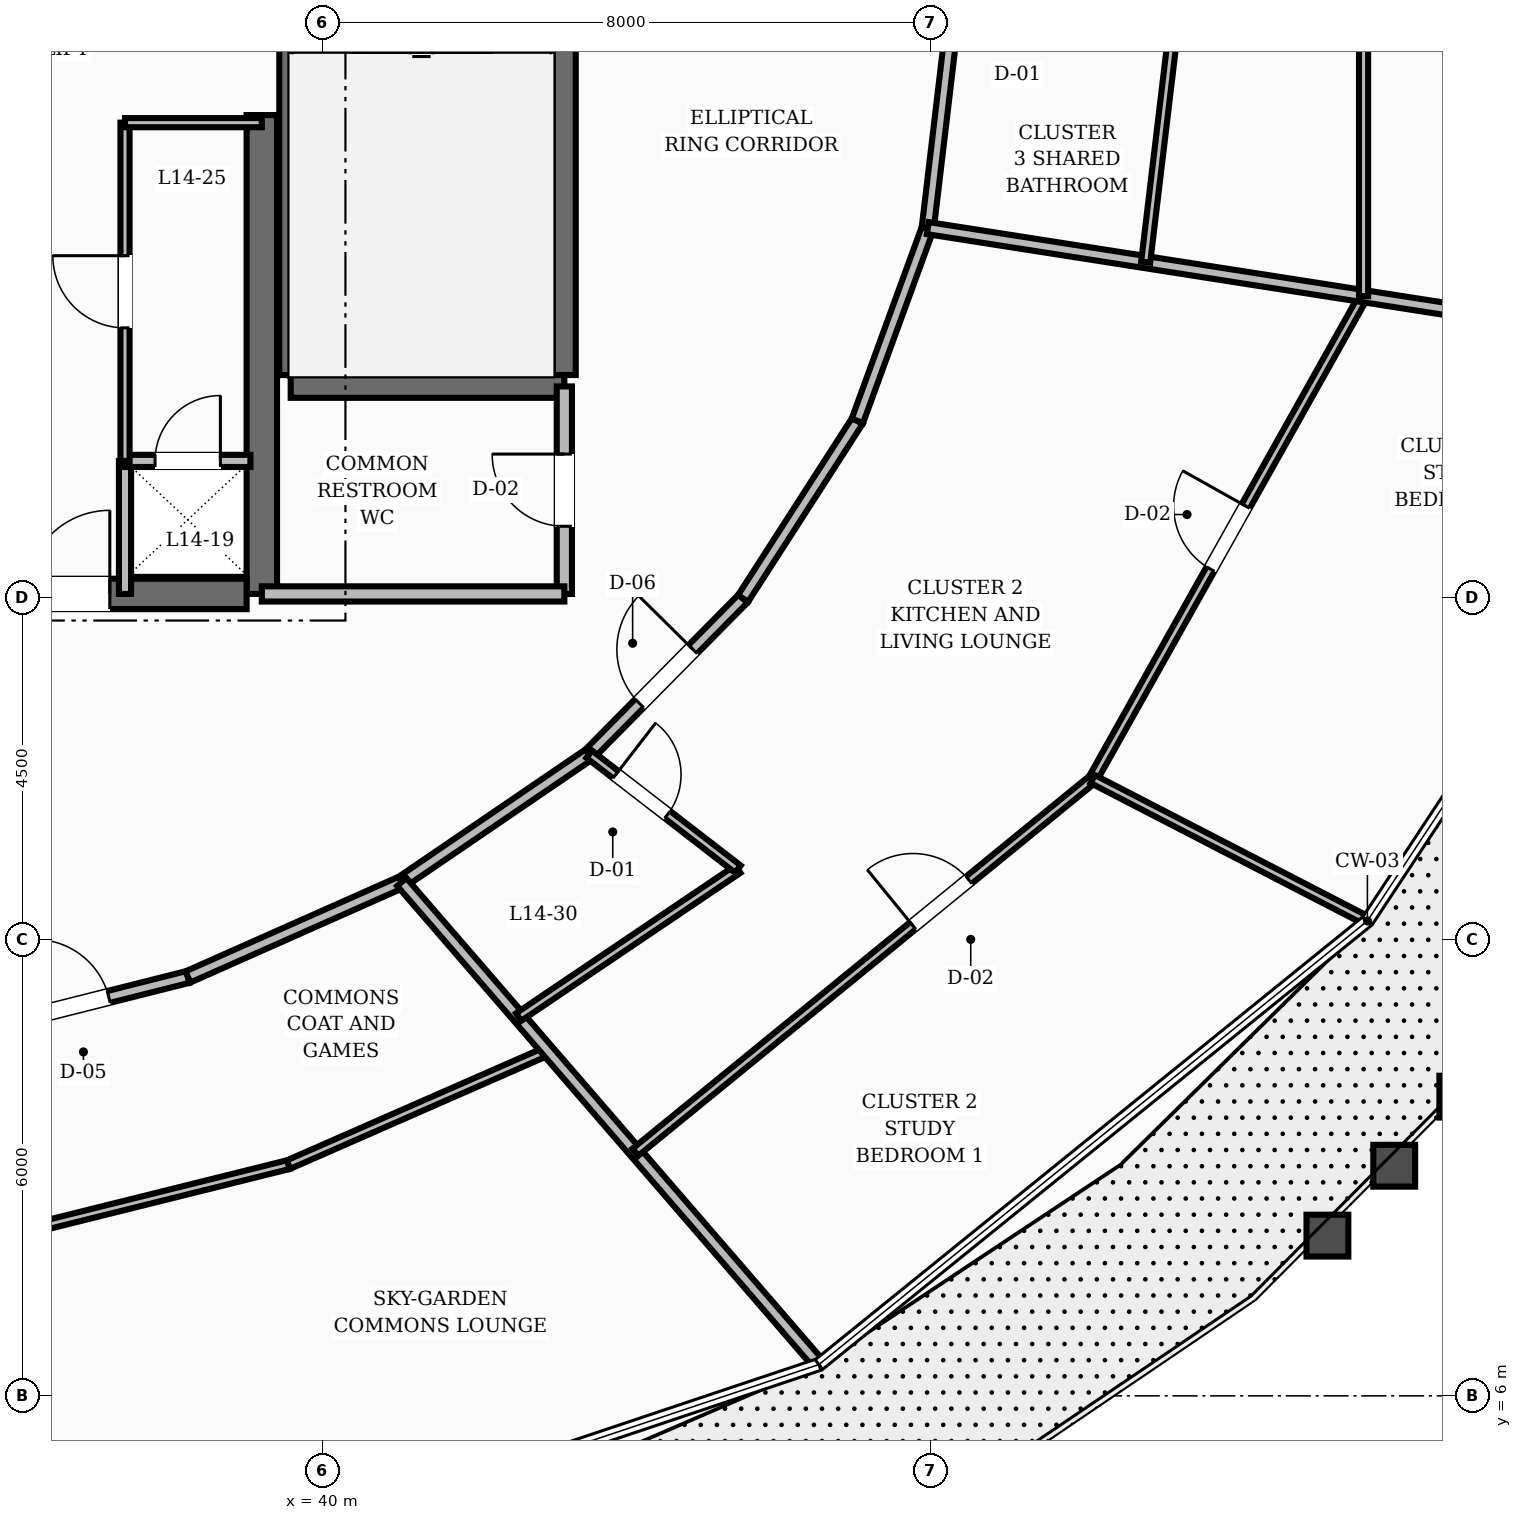
"""IFC4 building model, lengths in metres.
Left out: names, types, materials, properties, quantities, classifications, styles, units other than length and angle.
Written with IfcOpenShell. Run it as: python <this file> out.ifc"""

import sys

from ifc_helpers import new_model, si_unit, direction, frame, frame_2d, origin, place, context, subcontext, project, spatial, rectangle, extrude, element, fill, save


model = new_model("IFC4")
c1 = context("Model", 3, precision=1e-05, world=origin(), true_north=direction((0.0, 1.0)))
c2 = subcontext(c1, "Body", "Model", "MODEL_VIEW")
j1 = project(units=[si_unit("LENGTHUNIT", "METRE"), si_unit("PLANEANGLEUNIT", "RADIAN")], contexts=[c1])
p1 = place(None, origin())
s1 = spatial("IfcSite", under=j1, at=p1, CompositionType="ELEMENT")
p2 = place(p1, origin())
s2 = spatial("IfcBuilding", under=s1, at=p2, CompositionType="ELEMENT")
p3 = place(p2, frame((0.0, 0.0, 59.2)))
s3 = spatial("IfcBuildingStorey", under=s2, at=p3, CompositionType="ELEMENT", Elevation=59.2)
p4 = place(p3, frame((39.2, 16.55, 0.0), z_axis=(0.0, 0.0, 1.0), x_axis=(0.0, 1.0, 0.0)))
e1 = element("IfcWall", 1, at=p4, inside=s3, PredefinedType="SHEAR", context=c2, shape_type="SweptSolid", body=[
    extrude(rectangle(XDim=6.3, YDim=0.4, at=frame_2d((3.15, 0.0))), origin(), (0.0, 0.0, 1.0), 3.6),
])
p5 = place(p3, frame((35.8, 16.55, 0.0), z_axis=(0.0, 0.0, 1.0), x_axis=(1.0, 0.0, 0.0)))
e2 = element("IfcWall", 2, at=p5, inside=s3, PredefinedType="SHEAR", context=c2, shape_type="SweptSolid", body=[
    extrude(rectangle(XDim=3.2, YDim=0.4, at=frame_2d((1.6, 0.0))), origin(), (0.0, 0.0, 1.0), 3.6),
])
p6 = place(p5, frame((0.3, 0.0, 0.0)))
e3 = element("IfcOpeningElement", 3, at=p6, cuts=e2, PredefinedType="OPENING", context=c2, shape_type="SweptSolid", body=[
    extrude(rectangle(XDim=1.1, YDim=2.1, at=frame_2d((0.55, 1.05))), frame((0.0, 0.21, 0.0), z_axis=(0.0, -1.0, 0.0), x_axis=(1.0, 0.0, 0.0)), (0.0, 0.0, 1.0), 0.42),
])
for number, where, z_axis, x_axis in (
    (4, (43.18, 19.43, 0.0), (0.0, 0.0, 1.0), (0.0, 1.0, 0.0)),
    (5, (39.58, 19.43, 0.0), (0.0, 0.0, 1.0), (0.0, 1.0, 0.0)),
):
    element("IfcWall", number, at=place(p3, frame(where, z_axis=z_axis, x_axis=x_axis)), inside=s3, PredefinedType="SHEAR", context=c2, shape_type="SweptSolid", body=[
        extrude(rectangle(XDim=8.74, YDim=0.3, at=frame_2d((4.37, 0.0))), origin(), (0.0, 0.0, 1.0), 3.6),
    ])
p7 = place(p3, frame((39.58, 19.28, 0.0), z_axis=(0.0, 0.0, 1.0), x_axis=(1.0, 0.0, 0.0)))
e6 = element("IfcWall", 6, at=p7, inside=s3, PredefinedType="SHEAR", context=c2, shape_type="SweptSolid", body=[
    extrude(rectangle(XDim=3.6, YDim=0.3, at=frame_2d((1.8, 0.0))), origin(), (0.0, 0.0, 1.0), 3.6),
])
p8 = place(p3, frame((43.18, 16.55, 0.0), z_axis=(0.0, 0.0, 1.0), x_axis=(0.0, 1.0, 0.0)))
e7 = element("IfcWall", 7, at=p8, inside=s3, PredefinedType="SOLIDWALL", context=c2, shape_type="SweptSolid", body=[
    extrude(rectangle(XDim=2.73, YDim=0.2, at=frame_2d((1.365, 0.0))), origin(), (0.0, 0.0, 1.0), 2.61),
])
p9 = place(p8, frame((0.89, 0.0, 0.0)))
e8 = element("IfcOpeningElement", 8, at=p9, cuts=e7, PredefinedType="OPENING", context=c2, shape_type="SweptSolid", body=[
    extrude(rectangle(XDim=0.95, YDim=2.1, at=frame_2d((0.475, 1.05))), frame((0.0, 0.11, 0.0), z_axis=(0.0, -1.0, 0.0), x_axis=(1.0, 0.0, 0.0)), (0.0, 0.0, 1.0), 0.22),
])
p10 = place(p3, frame((39.2, 16.55, 0.0), z_axis=(0.0, 0.0, 1.0), x_axis=(1.0, 0.0, 0.0)))
e9 = element("IfcWall", 9, at=p10, inside=s3, PredefinedType="SOLIDWALL", context=c2, shape_type="SweptSolid", body=[
    extrude(rectangle(XDim=3.98, YDim=0.2, at=frame_2d((1.99, 0.0))), origin(), (0.0, 0.0, 1.0), 2.61),
])
p11 = place(p3, frame((37.4, 16.55, 0.0), z_axis=(0.0, 0.0, 1.0), x_axis=(0.0, 1.0, 0.0)))
e10 = element("IfcWall", 10, at=p11, inside=s3, PredefinedType="SOLIDWALL", context=c2, shape_type="SweptSolid", body=[
    extrude(rectangle(XDim=1.75, YDim=0.16, at=frame_2d((0.875, 0.0))), origin(), (0.0, 0.0, 1.0), 2.61),
])
p12 = place(p3, frame((37.4, 18.3, 0.0), z_axis=(0.0, 0.0, 1.0), x_axis=(1.0, 0.0, 0.0)))
e11 = element("IfcWall", 11, at=p12, inside=s3, PredefinedType="SOLIDWALL", context=c2, shape_type="SweptSolid", body=[
    extrude(rectangle(XDim=1.65, YDim=0.16, at=frame_2d((0.825, 0.0))), origin(), (0.0, 0.0, 1.0), 2.61),
])
p13 = place(p12, frame((0.395, 0.0, 0.0)))
e12 = element("IfcOpeningElement", 12, at=p13, cuts=e11, PredefinedType="OPENING", context=c2, shape_type="SweptSolid", body=[
    extrude(rectangle(XDim=0.86, YDim=2.1, at=frame_2d((0.43, 1.05))), frame((0.0, 0.09, 0.0), z_axis=(0.0, -1.0, 0.0), x_axis=(1.0, 0.0, 0.0)), (0.0, 0.0, 1.0), 0.18),
])
p14 = place(p3, frame((37.4, 18.3, 0.0), z_axis=(0.0, 0.0, 1.0), x_axis=(0.0, 1.0, 0.0)))
e13 = element("IfcWall", 13, at=p14, inside=s3, PredefinedType="PARTITIONING", context=c2, shape_type="SweptSolid", body=[
    extrude(rectangle(XDim=4.45, YDim=0.12, at=frame_2d((2.225, 0.0))), origin(), (0.0, 0.0, 1.0), 2.61),
])
p15 = place(p14, frame((1.75, 0.0, 0.0)))
e14 = element("IfcOpeningElement", 14, at=p15, cuts=e13, PredefinedType="OPENING", context=c2, shape_type="SweptSolid", body=[
    extrude(rectangle(XDim=0.95, YDim=2.1, at=frame_2d((0.475, 1.05))), frame((0.0, 0.07, 0.0), z_axis=(0.0, -1.0, 0.0), x_axis=(1.0, 0.0, 0.0)), (0.0, 0.0, 1.0), 0.14),
])
p16 = place(p3, frame((37.4, 22.75, 0.0), z_axis=(0.0, 0.0, 1.0), x_axis=(1.0, 0.0, 0.0)))
e15 = element("IfcWall", 15, at=p16, inside=s3, PredefinedType="PARTITIONING", context=c2, shape_type="SweptSolid", body=[
    extrude(rectangle(XDim=1.8, YDim=0.12, at=frame_2d((0.9, 0.0))), origin(), (0.0, 0.0, 1.0), 2.61),
])
p17 = place(p3, frame((35.175, 10.742, 0.0), z_axis=(0.0, 0.0, 1.0), x_axis=(0.969689238064, 0.244341526521, 0.0)))
e16 = element("IfcWall", 16, at=p17, inside=s3, PredefinedType="SOLIDWALL", context=c2, shape_type="SweptSolid", body=[
    extrude(rectangle(XDim=3.148, YDim=0.16, at=frame_2d((1.574, 0.0))), origin(), (0.0, 0.0, 1.0), 2.61),
])
p18 = place(p17, frame((1.074, 0.0, 0.0)))
e17 = element("IfcOpeningElement", 17, at=p18, cuts=e16, PredefinedType="OPENING", context=c2, shape_type="SweptSolid", body=[
    extrude(rectangle(XDim=1.0, YDim=2.1, at=frame_2d((0.5, 1.05))), frame((0.0, 0.09, 0.0), z_axis=(0.0, -1.0, 0.0), x_axis=(1.0, 0.0, 0.0)), (0.0, 0.0, 1.0), 0.18),
])
p19 = place(p3, frame((38.228, 11.511, 0.0), z_axis=(0.0, 0.0, 1.0), x_axis=(0.913952123493, 0.405822024984, 0.0)))
e18 = element("IfcWall", 18, at=p19, inside=s3, PredefinedType="SOLIDWALL", context=c2, shape_type="SweptSolid", body=[
    extrude(rectangle(XDim=3.078, YDim=0.16, at=frame_2d((1.539, 0.0))), origin(), (0.0, 0.0, 1.0), 2.61),
])
p20 = place(p3, frame((41.041, 12.76, 0.0), z_axis=(0.0, 0.0, 1.0), x_axis=(0.826293096206, 0.56324037423, 0.0)))
e19 = element("IfcWall", 19, at=p20, inside=s3, PredefinedType="SOLIDWALL", context=c2, shape_type="SweptSolid", body=[
    extrude(rectangle(XDim=2.985, YDim=0.16, at=frame_2d((1.492, 0.0))), origin(), (0.0, 0.0, 1.0), 2.61),
])
p21 = place(p3, frame((43.508, 14.441, 0.0), z_axis=(0.0, 0.0, 1.0), x_axis=(0.702811997, 0.711375636969, 0.0)))
e20 = element("IfcWall", 20, at=p21, inside=s3, PredefinedType="SOLIDWALL", context=c2, shape_type="SweptSolid", body=[
    extrude(rectangle(XDim=2.879, YDim=0.16, at=frame_2d((1.44, 0.0))), origin(), (0.0, 0.0, 1.0), 2.61),
])
p22 = place(p21, frame((0.94, 0.0, 0.0)))
e21 = element("IfcOpeningElement", 21, at=p22, cuts=e20, PredefinedType="OPENING", context=c2, shape_type="SweptSolid", body=[
    extrude(rectangle(XDim=1.0, YDim=2.1, at=frame_2d((0.5, 1.05))), frame((0.0, 0.09, 0.0), z_axis=(0.0, -1.0, 0.0), x_axis=(1.0, 0.0, 0.0)), (0.0, 0.0, 1.0), 0.18),
])
p23 = place(p3, frame((45.531, 16.49, 0.0), z_axis=(0.0, 0.0, 1.0), x_axis=(0.541126045017, 0.840941498206, 0.0)))
e22 = element("IfcWall", 22, at=p23, inside=s3, PredefinedType="SOLIDWALL", context=c2, shape_type="SweptSolid", body=[
    extrude(rectangle(XDim=2.779, YDim=0.16, at=frame_2d((1.39, 0.0))), origin(), (0.0, 0.0, 1.0), 2.61),
])
p24 = place(p3, frame((47.035, 18.827, 0.0), z_axis=(0.0, 0.0, 1.0), x_axis=(0.343013437329, 0.939330496583, 0.0)))
e23 = element("IfcWall", 23, at=p24, inside=s3, PredefinedType="SOLIDWALL", context=c2, shape_type="SweptSolid", body=[
    extrude(rectangle(XDim=2.7, YDim=0.16, at=frame_2d((1.35, 0.0))), origin(), (0.0, 0.0, 1.0), 2.61),
])
p25 = place(p3, frame((47.961, 21.363, 0.0), z_axis=(0.0, 0.0, 1.0), x_axis=(0.117763961213, 0.99304161516, 0.0)))
e24 = element("IfcWall", 24, at=p25, inside=s3, PredefinedType="SOLIDWALL", context=c2, shape_type="SweptSolid", body=[
    extrude(rectangle(XDim=2.656, YDim=0.16, at=frame_2d((1.328, 0.0))), origin(), (0.0, 0.0, 1.0), 2.61),
])
p26 = place(p3, frame((35.849, 8.121, 0.0), z_axis=(0.0, 0.0, 1.0), x_axis=(0.970386733017, 0.241556594579, 0.0)))
e25 = element("IfcWall", 25, at=p26, inside=s3, PredefinedType="PARTITIONING", context=c2, shape_type="SweptSolid", body=[
    extrude(rectangle(XDim=3.814, YDim=0.12, at=frame_2d((1.907, 0.0))), origin(), (0.0, 0.0, 1.0), 2.61),
])
p27 = place(p3, frame((39.551, 9.042, 0.0), z_axis=(0.0, 0.0, 1.0), x_axis=(0.915800473989, 0.401633529278, 0.0)))
e26 = element("IfcWall", 26, at=p27, inside=s3, PredefinedType="PARTITIONING", context=c2, shape_type="SweptSolid", body=[
    extrude(rectangle(XDim=3.725, YDim=0.12, at=frame_2d((1.863, 0.0))), origin(), (0.0, 0.0, 1.0), 2.61),
])
p28 = place(p3, frame((41.041, 12.76, 0.0), z_axis=(0.0, 0.0, 1.0), x_axis=(0.654032006628, -0.756466875881, 0.0)))
e27 = element("IfcWall", 27, at=p28, inside=s3, PredefinedType="SOLIDWALL", context=c2, shape_type="SweptSolid", body=[
    extrude(rectangle(XDim=8.342, YDim=0.16, at=frame_2d((4.171, 0.0))), origin(), (0.0, 0.0, 1.0), 2.61),
])
p29 = place(p3, frame((42.578, 10.983, 0.0), z_axis=(0.0, 0.0, 1.0), x_axis=(0.828951119093, 0.559321054632, 0.0)))
e28 = element("IfcWall", 28, at=p29, inside=s3, PredefinedType="PARTITIONING", context=c2, shape_type="SweptSolid", body=[
    extrude(rectangle(XDim=3.481, YDim=0.12, at=frame_2d((1.74, 0.0))), origin(), (0.0, 0.0, 1.0), 2.61),
])
p30 = place(p3, frame((43.508, 14.441, 0.0), z_axis=(0.0, 0.0, 1.0), x_axis=(0.791204628393, -0.611551499065, 0.0)))
e29 = element("IfcWall", 29, at=p30, inside=s3, PredefinedType="PARTITIONING", context=c2, shape_type="SweptSolid", body=[
    extrude(rectangle(XDim=2.472, YDim=0.12, at=frame_2d((1.236, 0.0))), origin(), (0.0, 0.0, 1.0), 2.61),
])
p31 = place(p30, frame((0.44, 0.0, 0.0)))
e30 = element("IfcOpeningElement", 30, at=p31, cuts=e29, PredefinedType="OPENING", context=c2, shape_type="SweptSolid", body=[
    extrude(rectangle(XDim=0.86, YDim=2.1, at=frame_2d((0.43, 1.05))), frame((0.0, 0.07, 0.0), z_axis=(0.0, -1.0, 0.0), x_axis=(1.0, 0.0, 0.0)), (0.0, 0.0, 1.0), 0.14),
])
p32 = place(p3, frame((44.115, 9.205, 0.0), z_axis=(0.0, 0.0, 1.0), x_axis=(0.774795715617, 0.632211672671, 0.0)))
e31 = element("IfcWall", 31, at=p32, inside=s3, PredefinedType="PARTITIONING", context=c2, shape_type="SweptSolid", body=[
    extrude(rectangle(XDim=7.765, YDim=0.12, at=frame_2d((3.883, 0.0))), origin(), (0.0, 0.0, 1.0), 2.61),
])
p33 = place(p32, frame((4.713, 0.0, 0.0)))
e32 = element("IfcOpeningElement", 32, at=p33, cuts=e31, PredefinedType="OPENING", context=c2, shape_type="SweptSolid", body=[
    extrude(rectangle(XDim=0.95, YDim=2.1, at=frame_2d((0.475, 1.05))), frame((0.0, 0.07, 0.0), z_axis=(0.0, -1.0, 0.0), x_axis=(1.0, 0.0, 0.0)), (0.0, 0.0, 1.0), 0.14),
])
p34 = place(p3, frame((50.131, 14.115, 0.0), z_axis=(0.0, 0.0, 1.0), x_axis=(0.489207447667, 0.872167457056, 0.0)))
e33 = element("IfcWall", 33, at=p34, inside=s3, PredefinedType="PARTITIONING", context=c2, shape_type="SweptSolid", body=[
    extrude(rectangle(XDim=7.284, YDim=0.12, at=frame_2d((3.642, 0.0))), origin(), (0.0, 0.0, 1.0), 2.61),
])
p35 = place(p34, frame((3.167, 0.0, 0.0)))
e34 = element("IfcOpeningElement", 34, at=p35, cuts=e33, PredefinedType="OPENING", context=c2, shape_type="SweptSolid", body=[
    extrude(rectangle(XDim=0.95, YDim=2.1, at=frame_2d((0.475, 1.05))), frame((0.0, 0.07, 0.0), z_axis=(0.0, -1.0, 0.0), x_axis=(1.0, 0.0, 0.0)), (0.0, 0.0, 1.0), 0.14),
])
p36 = place(p3, frame((50.131, 14.115, 0.0), z_axis=(0.0, 0.0, 1.0), x_axis=(0.88850478296, -0.458867356277, 0.0)))
e35 = element("IfcWall", 35, at=p36, inside=s3, PredefinedType="PARTITIONING", context=c2, shape_type="SweptSolid", body=[
    extrude(rectangle(XDim=4.018, YDim=0.12, at=frame_2d((2.009, 0.0))), origin(), (0.0, 0.0, 1.0), 2.61),
])
p37 = place(p3, frame((47.961, 21.363, 0.0), z_axis=(0.0, 0.0, 1.0), x_axis=(0.988025684157, -0.154289492336, 0.0)))
e36 = element("IfcWall", 36, at=p37, inside=s3, PredefinedType="SOLIDWALL", context=c2, shape_type="SweptSolid", body=[
    extrude(rectangle(XDim=10.312, YDim=0.16, at=frame_2d((5.156, 0.0))), origin(), (0.0, 0.0, 1.0), 2.61),
])
p38 = place(p3, frame((50.828, 20.915, 0.0), z_axis=(0.0, 0.0, 1.0), x_axis=(0.118742368253, 0.992925097871, 0.0)))
e37 = element("IfcWall", 37, at=p38, inside=s3, PredefinedType="PARTITIONING", context=c2, shape_type="SweptSolid", body=[
    extrude(rectangle(XDim=3.107, YDim=0.12, at=frame_2d((1.553, 0.0))), origin(), (0.0, 0.0, 1.0), 2.61),
])
p39 = place(p3, frame((53.695, 20.468, 0.0), z_axis=(0.0, 0.0, 1.0), x_axis=(0.0, 1.0, 0.0)))
e38 = element("IfcWall", 38, at=p39, inside=s3, PredefinedType="PARTITIONING", context=c2, shape_type="SweptSolid", body=[
    extrude(rectangle(XDim=7.065, YDim=0.12, at=frame_2d((3.532, 0.0))), origin(), (0.0, 0.0, 1.0), 2.61),
])
p40 = place(p39, frame((4.209, 0.0, 0.0)))
e39 = element("IfcOpeningElement", 39, at=p40, cuts=e38, PredefinedType="OPENING", context=c2, shape_type="SweptSolid", body=[
    extrude(rectangle(XDim=0.95, YDim=2.1, at=frame_2d((0.475, 1.05))), frame((0.0, 0.07, 0.0), z_axis=(0.0, -1.0, 0.0), x_axis=(1.0, 0.0, 0.0)), (0.0, 0.0, 1.0), 0.14),
])
p41 = place(p9, origin())
e40 = element("IfcDoor", 40, at=p41, inside=s3, OperationType="SINGLE_SWING_RIGHT", PredefinedType="DOOR", context=c2, shape_type="SweptSolid", body=[
    extrude(rectangle(XDim=0.95, YDim=2.1, at=frame_2d((0.475, 1.05))), frame((0.0, 0.025, 0.0), z_axis=(0.0, -1.0, 0.0), x_axis=(1.0, 0.0, 0.0)), (0.0, 0.0, 1.0), 0.05),
])
fill(e8, e40)
p42 = place(p6, origin())
e41 = element("IfcDoor", 41, at=p42, inside=s3, OperationType="SINGLE_SWING_RIGHT", PredefinedType="DOOR", context=c2, shape_type="SweptSolid", body=[
    extrude(rectangle(XDim=1.1, YDim=2.1, at=frame_2d((0.55, 1.05))), frame((0.0, 0.025, 0.0), z_axis=(0.0, -1.0, 0.0), x_axis=(1.0, 0.0, 0.0)), (0.0, 0.0, 1.0), 0.05),
])
fill(e3, e41)
p43 = place(p13, origin())
e42 = element("IfcDoor", 42, at=p43, inside=s3, OperationType="SINGLE_SWING_RIGHT", PredefinedType="TRAPDOOR", context=c2, shape_type="SweptSolid", body=[
    extrude(rectangle(XDim=0.86, YDim=2.1, at=frame_2d((0.43, 1.05))), frame((0.0, 0.025, 0.0), z_axis=(0.0, -1.0, 0.0), x_axis=(1.0, 0.0, 0.0)), (0.0, 0.0, 1.0), 0.05),
])
fill(e12, e42)
p44 = place(p15, origin())
e43 = element("IfcDoor", 43, at=p44, inside=s3, OperationType="SINGLE_SWING_RIGHT", PredefinedType="DOOR", context=c2, shape_type="SweptSolid", body=[
    extrude(rectangle(XDim=0.95, YDim=2.1, at=frame_2d((0.475, 1.05))), frame((0.0, 0.025, 0.0), z_axis=(0.0, -1.0, 0.0), x_axis=(1.0, 0.0, 0.0)), (0.0, 0.0, 1.0), 0.05),
])
fill(e14, e43)
p45 = place(p18, origin())
e44 = element("IfcDoor", 44, at=p45, inside=s3, OperationType="SINGLE_SWING_LEFT", PredefinedType="DOOR", context=c2, shape_type="SweptSolid", body=[
    extrude(rectangle(XDim=1.0, YDim=2.1, at=frame_2d((0.5, 1.05))), frame((0.0, 0.025, 0.0), z_axis=(0.0, -1.0, 0.0), x_axis=(1.0, 0.0, 0.0)), (0.0, 0.0, 1.0), 0.05),
])
fill(e17, e44)
p46 = place(p31, origin())
e45 = element("IfcDoor", 45, at=p46, inside=s3, OperationType="SINGLE_SWING_LEFT", PredefinedType="DOOR", context=c2, shape_type="SweptSolid", body=[
    extrude(rectangle(XDim=0.86, YDim=2.1, at=frame_2d((0.43, 1.05))), frame((0.0, 0.025, 0.0), z_axis=(0.0, -1.0, 0.0), x_axis=(1.0, 0.0, 0.0)), (0.0, 0.0, 1.0), 0.05),
])
fill(e30, e45)
p47 = place(p22, origin())
e46 = element("IfcDoor", 46, at=p47, inside=s3, OperationType="SINGLE_SWING_RIGHT", PredefinedType="DOOR", context=c2, shape_type="SweptSolid", body=[
    extrude(rectangle(XDim=1.0, YDim=2.1, at=frame_2d((0.5, 1.05))), frame((0.0, 0.025, 0.0), z_axis=(0.0, -1.0, 0.0), x_axis=(1.0, 0.0, 0.0)), (0.0, 0.0, 1.0), 0.05),
])
fill(e21, e46)
p48 = place(p33, origin())
e47 = element("IfcDoor", 47, at=p48, inside=s3, OperationType="SINGLE_SWING_LEFT", PredefinedType="DOOR", context=c2, shape_type="SweptSolid", body=[
    extrude(rectangle(XDim=0.95, YDim=2.1, at=frame_2d((0.475, 1.05))), frame((0.0, 0.025, 0.0), z_axis=(0.0, -1.0, 0.0), x_axis=(1.0, 0.0, 0.0)), (0.0, 0.0, 1.0), 0.05),
])
fill(e32, e47)
p49 = place(p35, origin())
e48 = element("IfcDoor", 48, at=p49, inside=s3, OperationType="SINGLE_SWING_RIGHT", PredefinedType="DOOR", context=c2, shape_type="SweptSolid", body=[
    extrude(rectangle(XDim=0.95, YDim=2.1, at=frame_2d((0.475, 1.05))), frame((0.0, 0.025, 0.0), z_axis=(0.0, -1.0, 0.0), x_axis=(1.0, 0.0, 0.0)), (0.0, 0.0, 1.0), 0.05),
])
fill(e34, e48)
save(model, sys.argv[1])
